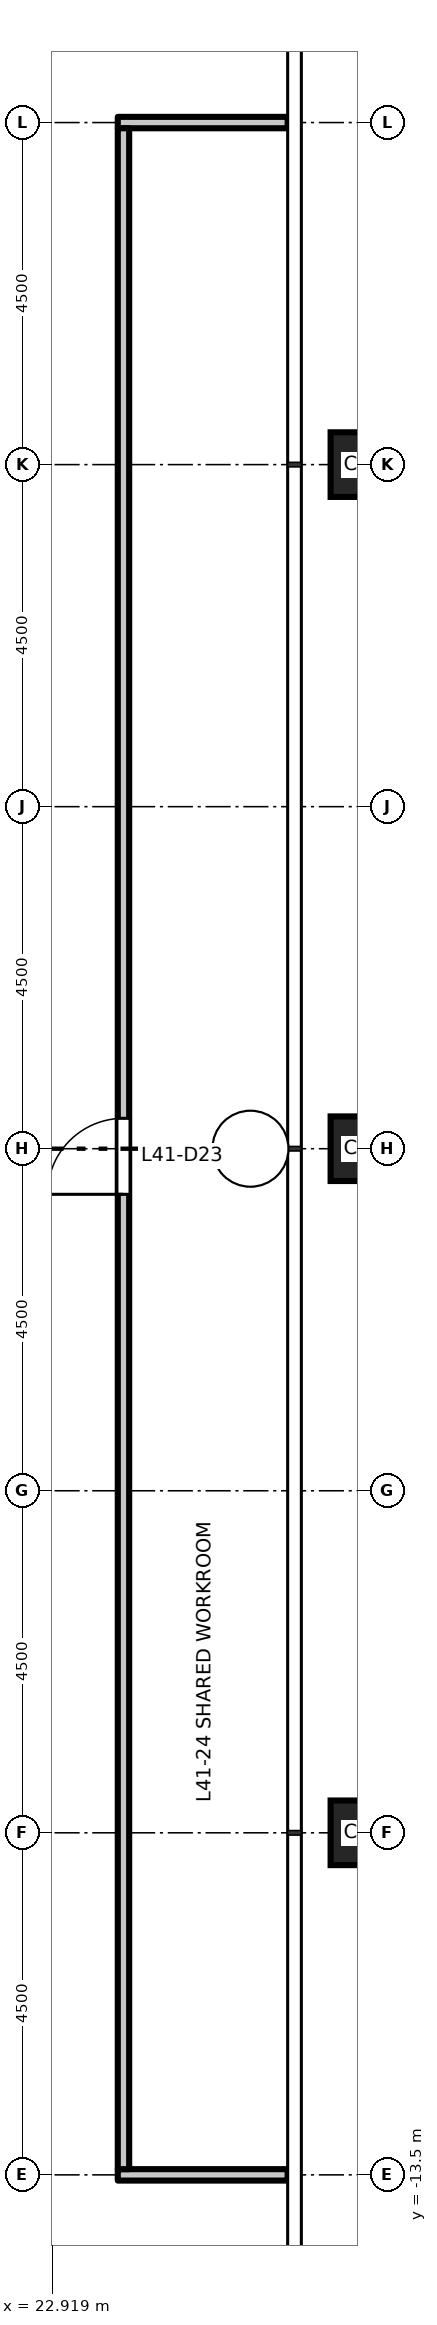
"""IFC4 building model, lengths in metres.
Left out: names, types, materials, properties, quantities, classifications, styles, units other than length and angle.
Written with IfcOpenShell. Run it as: python <this file> out.ifc"""

import sys

from ifc_helpers import new_model, si_unit, direction, frame, frame_2d, origin, origin_2d, place, context, subcontext, project, spatial, rectangle, hollow_rectangle, extrude, element, fill, save


model = new_model("IFC4")
c1 = context("Model", 3, precision=1e-05, world=origin(), true_north=direction((0.0, 1.0)))
c2 = subcontext(c1, "Body", "Model", "MODEL_VIEW")
j1 = project(units=[si_unit("LENGTHUNIT", "METRE"), si_unit("PLANEANGLEUNIT", "RADIAN")], contexts=[c1])
p1 = place(None, origin())
s1 = spatial("IfcSite", under=j1, at=p1, CompositionType="ELEMENT")
p2 = place(p1, origin())
s2 = spatial("IfcBuilding", under=s1, at=p2, CompositionType="ELEMENT")
p3 = place(p2, frame((0.0, 0.0, 192.7)))
s3 = spatial("IfcBuildingStorey", under=s2, at=p3, CompositionType="ELEMENT", Elevation=192.7)
for number, where, z_axis, x_axis in (
    (1, (27.0, -9.0, 0.0), (0.0, 0.0, 1.0), (1.0, 0.0, 0.0)),
    (2, (27.0, 0.0, 0.0), (0.0, 0.0, 1.0), (1.0, 0.0, 0.0)),
    (3, (27.0, 9.0, 0.0), (0.0, 0.0, 1.0), (1.0, 0.0, 0.0)),
):
    element("IfcColumn", number, at=place(p3, frame(where, z_axis=z_axis, x_axis=x_axis)), inside=s3, PredefinedType="COLUMN", context=c2, shape_type="SweptSolid", body=[
        extrude(hollow_rectangle(XDim=0.85, YDim=0.85, WallThickness=0.05, at=origin_2d()), origin(), (0.0, 0.0, 1.0), 4.5),
    ])
p4 = place(p3, frame((23.775, -13.5, 0.0), z_axis=(0.0, 0.0, 1.0), x_axis=(1.0, 0.0, 0.0)))
e4 = element("IfcWall", 4, at=p4, inside=s3, PredefinedType="PARTITIONING", context=c2, shape_type="SweptSolid", body=[
    extrude(rectangle(XDim=2.235, YDim=0.15, at=frame_2d((1.118, 0.0))), origin(), (0.0, 0.0, 1.0), 3.95),
])
p5 = place(p3, frame((23.775, 13.5, 0.0), z_axis=(0.0, 0.0, 1.0), x_axis=(1.0, 0.0, 0.0)))
e5 = element("IfcWall", 5, at=p5, inside=s3, PredefinedType="PARTITIONING", context=c2, shape_type="SweptSolid", body=[
    extrude(rectangle(XDim=2.235, YDim=0.15, at=frame_2d((1.118, 0.0))), origin(), (0.0, 0.0, 1.0), 4.35),
])
p6 = place(p3, frame((23.85, -13.425, 0.0), z_axis=(0.0, 0.0, 1.0), x_axis=(0.0, 1.0, 0.0)))
e6 = element("IfcWall", 6, at=p6, inside=s3, PredefinedType="PARTITIONING", context=c2, shape_type="SweptSolid", body=[
    extrude(rectangle(XDim=26.85, YDim=0.15, at=frame_2d((13.425, 0.0))), origin(), (0.0, 0.0, 1.0), 4.35),
])
p7 = place(p6, frame((12.825, 0.0, 0.0)))
e7 = element("IfcOpeningElement", 7, at=p7, cuts=e6, PredefinedType="OPENING", context=c2, shape_type="SweptSolid", body=[
    extrude(rectangle(XDim=1.0, YDim=2.1, at=frame_2d((0.5, 1.05))), frame((0.0, 0.085, 0.0), z_axis=(0.0, -1.0, 0.0), x_axis=(1.0, 0.0, 0.0)), (0.0, 0.0, 1.0), 0.17),
])
p8 = place(p7, origin())
e8 = element("IfcDoor", 8, at=p8, inside=s3, OperationType="SINGLE_SWING_LEFT", PredefinedType="DOOR", context=c2, shape_type="SweptSolid", body=[
    extrude(rectangle(XDim=1.0, YDim=2.1, at=frame_2d((0.5, 1.05))), frame((0.0, 0.025, 0.0), z_axis=(0.0, -1.0, 0.0), x_axis=(1.0, 0.0, 0.0)), (0.0, 0.0, 1.0), 0.05),
])
fill(e7, e8)
save(model, sys.argv[1])
